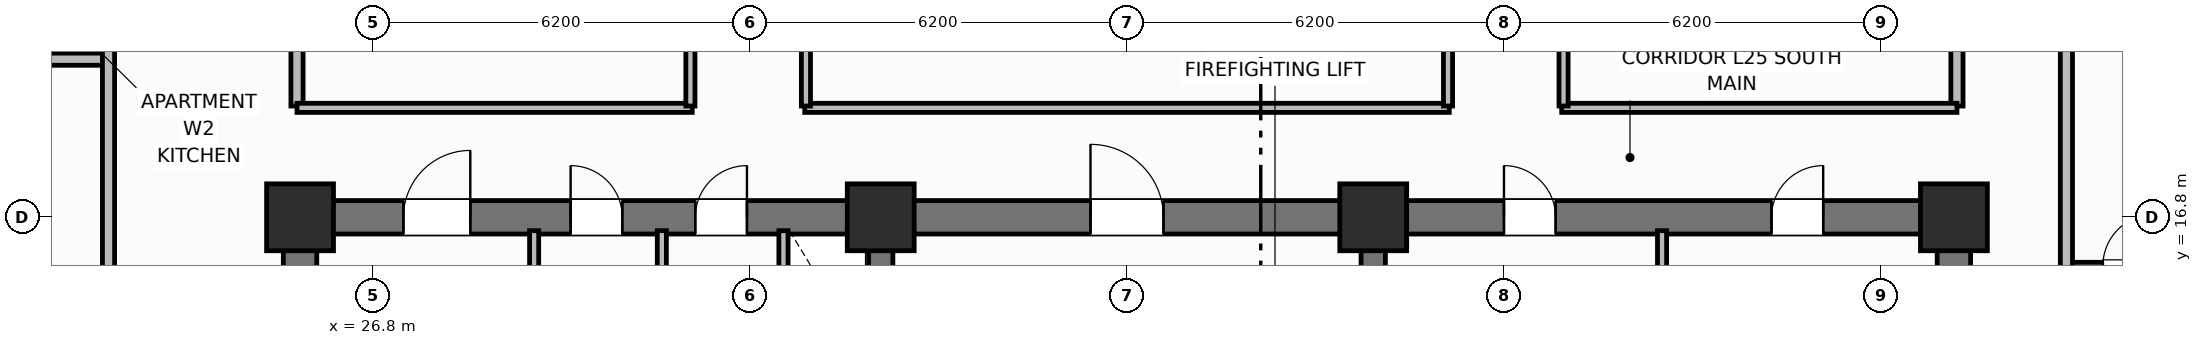
"""IFC4 building model, lengths in metres.
Left out: names, types, materials, properties, quantities, classifications, styles, units other than length and angle.
Written with IfcOpenShell. Run it as: python <this file> out.ifc"""

import sys

from ifc_helpers import new_model, si_unit, direction, frame, frame_2d, origin, origin_2d, place, context, subcontext, project, spatial, rectangle, extrude, element, fill, save


model = new_model("IFC4")
c1 = context("Model", 3, precision=1e-05, world=origin(), true_north=direction((0.0, 1.0)))
c2 = subcontext(c1, "Body", "Model", "MODEL_VIEW")
j1 = project(units=[si_unit("LENGTHUNIT", "METRE"), si_unit("PLANEANGLEUNIT", "RADIAN")], contexts=[c1])
p1 = place(None, origin())
s1 = spatial("IfcSite", under=j1, at=p1, CompositionType="ELEMENT")
p2 = place(p1, origin())
s2 = spatial("IfcBuilding", under=s1, at=p2, CompositionType="ELEMENT")
p3 = place(p2, frame((0.0, 0.0, 103.1)))
s3 = spatial("IfcBuildingStorey", under=s2, at=p3, CompositionType="ELEMENT", Elevation=103.1)
for number, where, z_axis, x_axis in (
    (1, (25.6, 10.875, 0.0), (0.0, 0.0, 1.0), (0.0, 1.0, 0.0)),
    (2, (52.8, 10.875, 0.0), (0.0, 0.0, 1.0), (0.0, 1.0, 0.0)),
):
    element("IfcWall", number, at=place(p3, frame(where, z_axis=z_axis, x_axis=x_axis)), inside=s3, PredefinedType="SHEAR", context=c2, shape_type="SweptSolid", body=[
        extrude(rectangle(XDim=5.65, YDim=0.55, at=frame_2d((2.825, 0.0))), origin(), (0.0, 0.0, 1.0), 3.7),
    ])
p4 = place(p3, frame((25.6, 16.8, 0.0), z_axis=(0.0, 0.0, 1.0), x_axis=(1.0, 0.0, 0.0)))
e3 = element("IfcWall", 3, at=p4, inside=s3, PredefinedType="SHEAR", context=c2, shape_type="SweptSolid", body=[
    extrude(rectangle(XDim=27.2, YDim=0.55, at=frame_2d((13.6, 0.0))), origin(), (0.0, 0.0, 1.0), 3.7),
])
p5 = place(p4, frame((1.7, 0.0, 0.0)))
e4 = element("IfcOpeningElement", 4, at=p5, cuts=e3, PredefinedType="OPENING", context=c2, shape_type="SweptSolid", body=[
    extrude(rectangle(XDim=1.1, YDim=2.15, at=frame_2d((0.55, 1.075))), frame((0.0, 0.285, 0.0), z_axis=(0.0, -1.0, 0.0), x_axis=(1.0, 0.0, 0.0)), (0.0, 0.0, 1.0), 0.57),
])
p6 = place(p4, frame((4.45, 0.0, 0.0)))
e5 = element("IfcOpeningElement", 5, at=p6, cuts=e3, PredefinedType="OPENING", context=c2, shape_type="SweptSolid", body=[
    extrude(rectangle(XDim=0.85, YDim=2.1, at=frame_2d((0.425, 1.05))), frame((0.0, 0.285, 0.0), z_axis=(0.0, -1.0, 0.0), x_axis=(1.0, 0.0, 0.0)), (0.0, 0.0, 1.0), 0.57),
])
p7 = place(p4, frame((6.5, 0.0, 0.0)))
e6 = element("IfcOpeningElement", 6, at=p7, cuts=e3, PredefinedType="OPENING", context=c2, shape_type="SweptSolid", body=[
    extrude(rectangle(XDim=0.85, YDim=2.1, at=frame_2d((0.425, 1.05))), frame((0.0, 0.285, 0.0), z_axis=(0.0, -1.0, 0.0), x_axis=(1.0, 0.0, 0.0)), (0.0, 0.0, 1.0), 0.57),
])
p8 = place(p4, frame((13.0, 0.0, 0.0)))
e7 = element("IfcOpeningElement", 7, at=p8, cuts=e3, PredefinedType="OPENING", context=c2, shape_type="SweptSolid", body=[
    extrude(rectangle(XDim=1.2, YDim=2.15, at=frame_2d((0.6, 1.075))), frame((0.0, 0.285, 0.0), z_axis=(0.0, -1.0, 0.0), x_axis=(1.0, 0.0, 0.0)), (0.0, 0.0, 1.0), 0.57),
])
p9 = place(p4, frame((19.8, 0.0, 0.0)))
e8 = element("IfcOpeningElement", 8, at=p9, cuts=e3, PredefinedType="OPENING", context=c2, shape_type="SweptSolid", body=[
    extrude(rectangle(XDim=0.85, YDim=2.1, at=frame_2d((0.425, 1.05))), frame((0.0, 0.285, 0.0), z_axis=(0.0, -1.0, 0.0), x_axis=(1.0, 0.0, 0.0)), (0.0, 0.0, 1.0), 0.57),
])
p10 = place(p4, frame((24.2, 0.0, 0.0)))
e9 = element("IfcOpeningElement", 9, at=p10, cuts=e3, PredefinedType="OPENING", context=c2, shape_type="SweptSolid", body=[
    extrude(rectangle(XDim=0.85, YDim=2.1, at=frame_2d((0.425, 1.05))), frame((0.0, 0.285, 0.0), z_axis=(0.0, -1.0, 0.0), x_axis=(1.0, 0.0, 0.0)), (0.0, 0.0, 1.0), 0.57),
])
for number, where, z_axis, x_axis in (
    (10, (35.15, 10.875, 0.0), (0.0, 0.0, 1.0), (0.0, 1.0, 0.0)),
    (11, (43.25, 10.875, 0.0), (0.0, 0.0, 1.0), (0.0, 1.0, 0.0)),
):
    element("IfcWall", number, at=place(p3, frame(where, z_axis=z_axis, x_axis=x_axis)), inside=s3, PredefinedType="SHEAR", context=c2, shape_type="SweptSolid", body=[
        extrude(rectangle(XDim=5.65, YDim=0.4, at=frame_2d((2.825, 0.0))), origin(), (0.0, 0.0, 1.0), 3.7),
    ])
for number, where, z_axis, x_axis in (
    (12, (25.6, 16.8, 0.0), (0.0, 0.0, 1.0), (1.0, 0.0, 0.0)),
    (13, (35.15, 16.8, 0.0), (0.0, 0.0, 1.0), (1.0, 0.0, 0.0)),
    (14, (43.25, 16.8, 0.0), (0.0, 0.0, 1.0), (1.0, 0.0, 0.0)),
    (15, (52.8, 16.8, 0.0), (0.0, 0.0, 1.0), (1.0, 0.0, 0.0)),
):
    element("IfcColumn", number, at=place(p3, frame(where, z_axis=z_axis, x_axis=x_axis)), inside=s3, PredefinedType="COLUMN", context=c2, shape_type="SweptSolid", body=[
        extrude(rectangle(XDim=1.1, YDim=1.1, at=origin_2d()), origin(), (0.0, 0.0, 1.0), 3.7),
    ])
for number, where, z_axis, x_axis in (
    (16, (29.45, 14.5, 0.0), (0.0, 0.0, 1.0), (0.0, 1.0, 0.0)),
    (17, (31.55, 14.5, 0.0), (0.0, 0.0, 1.0), (0.0, 1.0, 0.0)),
):
    element("IfcWall", number, at=place(p3, frame(where, z_axis=z_axis, x_axis=x_axis)), inside=s3, PredefinedType="PARTITIONING", context=c2, shape_type="SweptSolid", body=[
        extrude(rectangle(XDim=2.08, YDim=0.15, at=frame_2d((1.04, 0.0))), origin(), (0.0, 0.0, 1.0), 2.53),
    ])
p11 = place(p3, frame((33.55, 14.5, 0.0), z_axis=(0.0, 0.0, 1.0), x_axis=(0.0, 1.0, 0.0)))
e18 = element("IfcWall", 18, at=p11, inside=s3, PredefinedType="PARTITIONING", context=c2, shape_type="SweptSolid", body=[
    extrude(rectangle(XDim=2.08, YDim=0.15, at=frame_2d((1.04, 0.0))), origin(), (0.0, 0.0, 1.0), 2.53),
])
p12 = place(p11, frame((0.55, 0.0, 0.0)))
e19 = element("IfcOpeningElement", 19, at=p12, cuts=e18, PredefinedType="OPENING", context=c2, shape_type="SweptSolid", body=[
    extrude(rectangle(XDim=0.85, YDim=2.05, at=frame_2d((0.425, 1.025))), frame((0.0, 0.085, 0.0), z_axis=(0.0, -1.0, 0.0), x_axis=(1.0, 0.0, 0.0)), (0.0, 0.0, 1.0), 0.17),
])
p13 = place(p3, frame((48.0, 10.95, 0.0), z_axis=(0.0, 0.0, 1.0), x_axis=(0.0, 1.0, 0.0)))
e20 = element("IfcWall", 20, at=p13, inside=s3, PredefinedType="PARTITIONING", context=c2, shape_type="SweptSolid", body=[
    extrude(rectangle(XDim=5.63, YDim=0.15, at=frame_2d((2.815, 0.0))), origin(), (0.0, 0.0, 1.0), 2.53),
])
for number, where, z_axis, x_axis in (
    (21, (25.55, 18.63, 0.0), (0.0, 0.0, 1.0), (0.0, 1.0, 0.0)),
    (22, (52.85, 18.63, 0.0), (0.0, 0.0, 1.0), (0.0, 1.0, 0.0)),
):
    element("IfcWall", number, at=place(p3, frame(where, z_axis=z_axis, x_axis=x_axis)), inside=s3, PredefinedType="PARTITIONING", context=c2, shape_type="SweptSolid", body=[
        extrude(rectangle(XDim=19.14, YDim=0.2, at=frame_2d((9.57, 0.0))), origin(), (0.0, 0.0, 1.0), 2.53),
    ])
p14 = place(p3, frame((25.55, 18.6, 0.0), z_axis=(0.0, 0.0, 1.0), x_axis=(1.0, 0.0, 0.0)))
e23 = element("IfcWall", 23, at=p14, inside=s3, PredefinedType="PARTITIONING", context=c2, shape_type="SweptSolid", body=[
    extrude(rectangle(XDim=6.5, YDim=0.15, at=frame_2d((3.25, 0.0))), origin(), (0.0, 0.0, 1.0), 2.53),
])
p15 = place(p3, frame((33.9, 18.6, 0.0), z_axis=(0.0, 0.0, 1.0), x_axis=(1.0, 0.0, 0.0)))
e24 = element("IfcWall", 24, at=p15, inside=s3, PredefinedType="PARTITIONING", context=c2, shape_type="SweptSolid", body=[
    extrude(rectangle(XDim=10.6, YDim=0.15, at=frame_2d((5.3, 0.0))), origin(), (0.0, 0.0, 1.0), 2.53),
])
p16 = place(p3, frame((46.35, 18.6, 0.0), z_axis=(0.0, 0.0, 1.0), x_axis=(1.0, 0.0, 0.0)))
e25 = element("IfcWall", 25, at=p16, inside=s3, PredefinedType="PARTITIONING", context=c2, shape_type="SweptSolid", body=[
    extrude(rectangle(XDim=6.5, YDim=0.15, at=frame_2d((3.25, 0.0))), origin(), (0.0, 0.0, 1.0), 2.53),
])
p17 = place(p3, frame((32.02, 18.63, 0.0), z_axis=(0.0, 0.0, 1.0), x_axis=(0.0, 1.0, 0.0)))
e26 = element("IfcWall", 26, at=p17, inside=s3, PredefinedType="PARTITIONING", context=c2, shape_type="SweptSolid", body=[
    extrude(rectangle(XDim=19.14, YDim=0.15, at=frame_2d((9.57, 0.0))), origin(), (0.0, 0.0, 1.0), 2.53),
])
p18 = place(p17, frame((3.0, 0.0, 0.0)))
e27 = element("IfcOpeningElement", 27, at=p18, cuts=e26, PredefinedType="OPENING", context=c2, shape_type="SweptSolid", body=[
    extrude(rectangle(XDim=0.9, YDim=2.1, at=frame_2d((0.45, 1.05))), frame((0.0, 0.085, 0.0), z_axis=(0.0, -1.0, 0.0), x_axis=(1.0, 0.0, 0.0)), (0.0, 0.0, 1.0), 0.17),
])
p19 = place(p17, frame((11.5, 0.0, 0.0)))
e28 = element("IfcOpeningElement", 28, at=p19, cuts=e26, PredefinedType="OPENING", context=c2, shape_type="SweptSolid", body=[
    extrude(rectangle(XDim=0.9, YDim=2.1, at=frame_2d((0.45, 1.05))), frame((0.0, 0.085, 0.0), z_axis=(0.0, -1.0, 0.0), x_axis=(1.0, 0.0, 0.0)), (0.0, 0.0, 1.0), 0.17),
])
p20 = place(p3, frame((33.92, 18.63, 0.0), z_axis=(0.0, 0.0, 1.0), x_axis=(0.0, 1.0, 0.0)))
e29 = element("IfcWall", 29, at=p20, inside=s3, PredefinedType="PARTITIONING", context=c2, shape_type="SweptSolid", body=[
    extrude(rectangle(XDim=19.14, YDim=0.15, at=frame_2d((9.57, 0.0))), origin(), (0.0, 0.0, 1.0), 2.53),
])
p21 = place(p20, frame((2.4, 0.0, 0.0)))
e30 = element("IfcOpeningElement", 30, at=p21, cuts=e29, PredefinedType="OPENING", context=c2, shape_type="SweptSolid", body=[
    extrude(rectangle(XDim=0.9, YDim=2.1, at=frame_2d((0.45, 1.05))), frame((0.0, 0.085, 0.0), z_axis=(0.0, -1.0, 0.0), x_axis=(1.0, 0.0, 0.0)), (0.0, 0.0, 1.0), 0.17),
])
p22 = place(p3, frame((44.48, 18.63, 0.0), z_axis=(0.0, 0.0, 1.0), x_axis=(0.0, 1.0, 0.0)))
e31 = element("IfcWall", 31, at=p22, inside=s3, PredefinedType="PARTITIONING", context=c2, shape_type="SweptSolid", body=[
    extrude(rectangle(XDim=19.14, YDim=0.15, at=frame_2d((9.57, 0.0))), origin(), (0.0, 0.0, 1.0), 2.53),
])
p23 = place(p22, frame((9.847, 0.0, 0.0)))
e32 = element("IfcOpeningElement", 32, at=p23, cuts=e31, PredefinedType="OPENING", context=c2, shape_type="SweptSolid", body=[
    extrude(rectangle(XDim=0.9, YDim=2.1, at=frame_2d((0.45, 1.05))), frame((0.0, 0.085, 0.0), z_axis=(0.0, -1.0, 0.0), x_axis=(1.0, 0.0, 0.0)), (0.0, 0.0, 1.0), 0.17),
])
p24 = place(p3, frame((46.38, 18.63, 0.0), z_axis=(0.0, 0.0, 1.0), x_axis=(0.0, 1.0, 0.0)))
e33 = element("IfcWall", 33, at=p24, inside=s3, PredefinedType="PARTITIONING", context=c2, shape_type="SweptSolid", body=[
    extrude(rectangle(XDim=19.14, YDim=0.15, at=frame_2d((9.57, 0.0))), origin(), (0.0, 0.0, 1.0), 2.53),
])
p25 = place(p24, frame((5.5, 0.0, 0.0)))
e34 = element("IfcOpeningElement", 34, at=p25, cuts=e33, PredefinedType="OPENING", context=c2, shape_type="SweptSolid", body=[
    extrude(rectangle(XDim=1.0, YDim=2.15, at=frame_2d((0.5, 1.075))), frame((0.0, 0.085, 0.0), z_axis=(0.0, -1.0, 0.0), x_axis=(1.0, 0.0, 0.0)), (0.0, 0.0, 1.0), 0.17),
])
p26 = place(p3, frame((14.57, 19.4, 0.0), z_axis=(0.0, 0.0, 1.0), x_axis=(1.0, 0.0, 0.0)))
e35 = element("IfcWall", 35, at=p26, inside=s3, PredefinedType="PARTITIONING", context=c2, shape_type="SweptSolid", body=[
    extrude(rectangle(XDim=7.88, YDim=0.2, at=frame_2d((3.94, 0.0))), origin(), (0.0, 0.0, 1.0), 2.53),
])
p27 = place(p3, frame((22.45, 10.6, 0.0), z_axis=(0.0, 0.0, 1.0), x_axis=(0.0, 1.0, 0.0)))
e36 = element("IfcWall", 36, at=p27, inside=s3, PredefinedType="PARTITIONING", context=c2, shape_type="SweptSolid", body=[
    extrude(rectangle(XDim=35.2, YDim=0.2, at=frame_2d((17.6, 0.0))), origin(), (0.0, 0.0, 1.0), 2.53),
])
p28 = place(p27, frame((2.65, 0.0, 0.0)))
e37 = element("IfcOpeningElement", 37, at=p28, cuts=e36, PredefinedType="OPENING", context=c2, shape_type="SweptSolid", body=[
    extrude(rectangle(XDim=1.0, YDim=2.15, at=frame_2d((0.5, 1.075))), frame((0.0, 0.11, 0.0), z_axis=(0.0, -1.0, 0.0), x_axis=(1.0, 0.0, 0.0)), (0.0, 0.0, 1.0), 0.22),
])
p29 = place(p27, frame((10.81, 0.0, 0.0)))
e38 = element("IfcOpeningElement", 38, at=p29, cuts=e36, PredefinedType="OPENING", context=c2, shape_type="SweptSolid", body=[
    extrude(rectangle(XDim=1.0, YDim=2.15, at=frame_2d((0.5, 1.075))), frame((0.0, 0.11, 0.0), z_axis=(0.0, -1.0, 0.0), x_axis=(1.0, 0.0, 0.0)), (0.0, 0.0, 1.0), 0.22),
])
p30 = place(p27, frame((19.54, 0.0, 0.0)))
e39 = element("IfcOpeningElement", 39, at=p30, cuts=e36, PredefinedType="OPENING", context=c2, shape_type="SweptSolid", body=[
    extrude(rectangle(XDim=1.0, YDim=2.15, at=frame_2d((0.5, 1.075))), frame((0.0, 0.11, 0.0), z_axis=(0.0, -1.0, 0.0), x_axis=(1.0, 0.0, 0.0)), (0.0, 0.0, 1.0), 0.22),
])
p31 = place(p27, frame((26.95, 0.0, 0.0)))
e40 = element("IfcOpeningElement", 40, at=p31, cuts=e36, PredefinedType="OPENING", context=c2, shape_type="SweptSolid", body=[
    extrude(rectangle(XDim=1.0, YDim=2.15, at=frame_2d((0.5, 1.075))), frame((0.0, 0.11, 0.0), z_axis=(0.0, -1.0, 0.0), x_axis=(1.0, 0.0, 0.0)), (0.0, 0.0, 1.0), 0.22),
])
p32 = place(p3, frame((54.65, 16.0, 0.0), z_axis=(0.0, 0.0, 1.0), x_axis=(1.0, 0.0, 0.0)))
e41 = element("IfcWall", 41, at=p32, inside=s3, PredefinedType="PARTITIONING", context=c2, shape_type="SweptSolid", body=[
    extrude(rectangle(XDim=2.25, YDim=0.12, at=frame_2d((1.125, 0.0))), origin(), (0.0, 0.0, 1.0), 2.53),
])
p33 = place(p32, frame((0.6, 0.0, 0.0)))
e42 = element("IfcOpeningElement", 42, at=p33, cuts=e41, PredefinedType="OPENING", context=c2, shape_type="SweptSolid", body=[
    extrude(rectangle(XDim=0.85, YDim=2.1, at=frame_2d((0.425, 1.05))), frame((0.0, 0.07, 0.0), z_axis=(0.0, -1.0, 0.0), x_axis=(1.0, 0.0, 0.0)), (0.0, 0.0, 1.0), 0.14),
])
p34 = place(p3, frame((54.65, 10.6, 0.0), z_axis=(0.0, 0.0, 1.0), x_axis=(0.0, 1.0, 0.0)))
e43 = element("IfcWall", 43, at=p34, inside=s3, PredefinedType="PARTITIONING", context=c2, shape_type="SweptSolid", body=[
    extrude(rectangle(XDim=35.2, YDim=0.2, at=frame_2d((17.6, 0.0))), origin(), (0.0, 0.0, 1.0), 2.53),
])
p35 = place(p34, frame((2.65, 0.0, 0.0)))
e44 = element("IfcOpeningElement", 44, at=p35, cuts=e43, PredefinedType="OPENING", context=c2, shape_type="SweptSolid", body=[
    extrude(rectangle(XDim=1.0, YDim=2.15, at=frame_2d((0.5, 1.075))), frame((0.0, 0.11, 0.0), z_axis=(0.0, -1.0, 0.0), x_axis=(1.0, 0.0, 0.0)), (0.0, 0.0, 1.0), 0.22),
])
p36 = place(p34, frame((19.95, 0.0, 0.0)))
e45 = element("IfcOpeningElement", 45, at=p36, cuts=e43, PredefinedType="OPENING", context=c2, shape_type="SweptSolid", body=[
    extrude(rectangle(XDim=1.0, YDim=2.15, at=frame_2d((0.5, 1.075))), frame((0.0, 0.11, 0.0), z_axis=(0.0, -1.0, 0.0), x_axis=(1.0, 0.0, 0.0)), (0.0, 0.0, 1.0), 0.22),
])
p37 = place(p33, origin())
e46 = element("IfcDoor", 46, at=p37, inside=s3, OperationType="SINGLE_SWING_RIGHT", PredefinedType="DOOR", context=c2, shape_type="SweptSolid", body=[
    extrude(rectangle(XDim=0.85, YDim=2.1, at=frame_2d((0.425, 1.05))), frame((0.0, 0.025, 0.0), z_axis=(0.0, -1.0, 0.0), x_axis=(1.0, 0.0, 0.0)), (0.0, 0.0, 1.0), 0.05),
])
fill(e42, e46)
p38 = place(p5, origin())
e47 = element("IfcDoor", 47, at=p38, inside=s3, OperationType="SINGLE_SWING_RIGHT", PredefinedType="DOOR", context=c2, shape_type="SweptSolid", body=[
    extrude(rectangle(XDim=1.1, YDim=2.15, at=frame_2d((0.55, 1.075))), frame((0.0, 0.025, 0.0), z_axis=(0.0, -1.0, 0.0), x_axis=(1.0, 0.0, 0.0)), (0.0, 0.0, 1.0), 0.05),
])
fill(e4, e47)
p39 = place(p6, origin())
e48 = element("IfcDoor", 48, at=p39, inside=s3, OperationType="SINGLE_SWING_LEFT", PredefinedType="DOOR", context=c2, shape_type="SweptSolid", body=[
    extrude(rectangle(XDim=0.85, YDim=2.1, at=frame_2d((0.425, 1.05))), frame((0.0, 0.025, 0.0), z_axis=(0.0, -1.0, 0.0), x_axis=(1.0, 0.0, 0.0)), (0.0, 0.0, 1.0), 0.05),
])
fill(e5, e48)
p40 = place(p7, origin())
e49 = element("IfcDoor", 49, at=p40, inside=s3, OperationType="SINGLE_SWING_RIGHT", PredefinedType="DOOR", context=c2, shape_type="SweptSolid", body=[
    extrude(rectangle(XDim=0.85, YDim=2.1, at=frame_2d((0.425, 1.05))), frame((0.0, 0.025, 0.0), z_axis=(0.0, -1.0, 0.0), x_axis=(1.0, 0.0, 0.0)), (0.0, 0.0, 1.0), 0.05),
])
fill(e6, e49)
p41 = place(p8, origin())
e50 = element("IfcDoor", 50, at=p41, inside=s3, OperationType="SINGLE_SWING_LEFT", PredefinedType="DOOR", context=c2, shape_type="SweptSolid", body=[
    extrude(rectangle(XDim=1.2, YDim=2.15, at=frame_2d((0.6, 1.075))), frame((0.0, 0.025, 0.0), z_axis=(0.0, -1.0, 0.0), x_axis=(1.0, 0.0, 0.0)), (0.0, 0.0, 1.0), 0.05),
])
fill(e7, e50)
p42 = place(p9, origin())
e51 = element("IfcDoor", 51, at=p42, inside=s3, OperationType="SINGLE_SWING_LEFT", PredefinedType="DOOR", context=c2, shape_type="SweptSolid", body=[
    extrude(rectangle(XDim=0.85, YDim=2.1, at=frame_2d((0.425, 1.05))), frame((0.0, 0.025, 0.0), z_axis=(0.0, -1.0, 0.0), x_axis=(1.0, 0.0, 0.0)), (0.0, 0.0, 1.0), 0.05),
])
fill(e8, e51)
p43 = place(p10, origin())
e52 = element("IfcDoor", 52, at=p43, inside=s3, OperationType="SINGLE_SWING_RIGHT", PredefinedType="DOOR", context=c2, shape_type="SweptSolid", body=[
    extrude(rectangle(XDim=0.85, YDim=2.1, at=frame_2d((0.425, 1.05))), frame((0.0, 0.025, 0.0), z_axis=(0.0, -1.0, 0.0), x_axis=(1.0, 0.0, 0.0)), (0.0, 0.0, 1.0), 0.05),
])
fill(e9, e52)
save(model, sys.argv[1])
